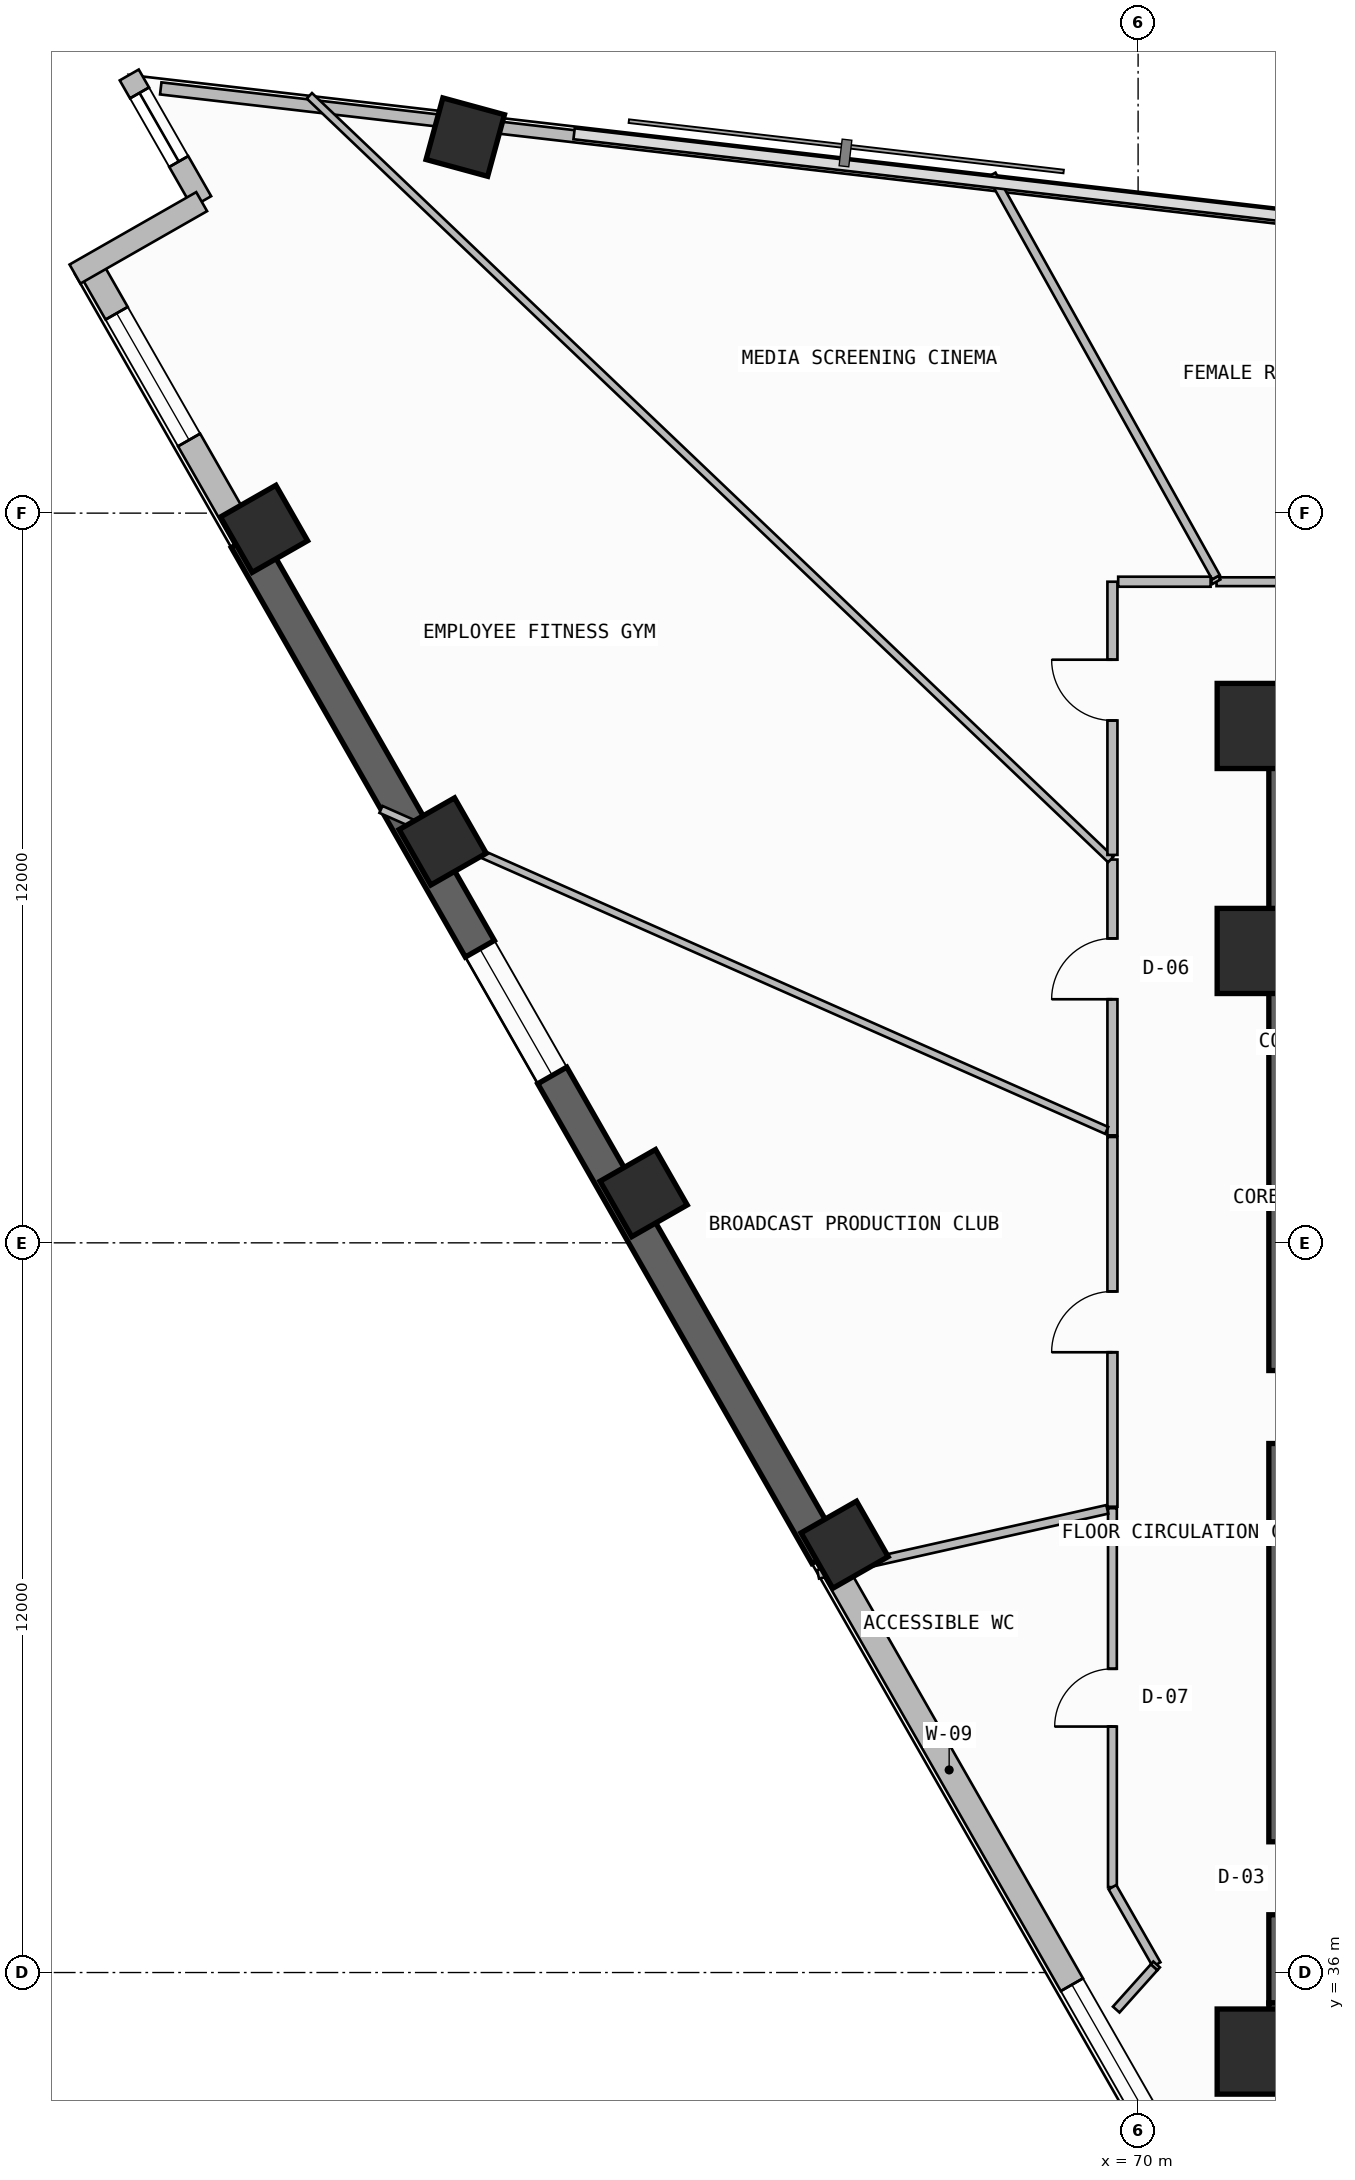
"""IFC4 building model, lengths in metres.
Left out: names, types, materials, properties, quantities, classifications, styles, units other than length and angle.
Written with IfcOpenShell. Run it as: python <this file> out.ifc"""

import sys

from ifc_helpers import new_model, si_unit, direction, frame, frame_2d, origin, origin_2d, place, context, subcontext, project, spatial, rectangle, extrude, element, fill, save


model = new_model("IFC4")
c1 = context("Model", 3, precision=1e-05, world=origin(), true_north=direction((0.0, 1.0)))
c2 = subcontext(c1, "Body", "Model", "MODEL_VIEW")
j1 = project(units=[si_unit("LENGTHUNIT", "METRE"), si_unit("PLANEANGLEUNIT", "RADIAN")], contexts=[c1])
p1 = place(None, origin())
s1 = spatial("IfcSite", under=j1, at=p1, CompositionType="ELEMENT")
p2 = place(p1, origin())
s2 = spatial("IfcBuilding", under=s1, at=p2, CompositionType="ELEMENT")
p3 = place(p2, frame((0.0, 0.0, 218.5)))
s3 = spatial("IfcBuildingStorey", under=s2, at=p3, CompositionType="ELEMENT", Elevation=218.5)
p4 = place(p3, frame((72.525, 35.5, -0.26), z_axis=(0.0, 0.0, 1.0), x_axis=(0.0, 1.0, 0.0)))
e1 = element("IfcWall", 1, at=p4, inside=s3, PredefinedType="SHEAR", context=c2, shape_type="SweptSolid", body=[
    extrude(rectangle(XDim=7.85, YDim=0.75, at=frame_2d((3.925, 0.0))), origin(), (0.0, 0.0, 1.0), 3.52),
])
p5 = place(p4, frame((1.45, 0.0, 0.26)))
e2 = element("IfcOpeningElement", 2, at=p5, cuts=e1, PredefinedType="OPENING", context=c2, shape_type="SweptSolid", body=[
    extrude(rectangle(XDim=1.2, YDim=2.2, at=frame_2d((0.6, 1.1))), frame((0.0, 0.385, 0.0), z_axis=(0.0, -1.0, 0.0), x_axis=(1.0, 0.0, 0.0)), (0.0, 0.0, 1.0), 0.77),
])
p6 = place(p3, frame((72.15, 35.125, -0.26), z_axis=(0.0, 0.0, 1.0), x_axis=(1.0, 0.0, 0.0)))
e3 = element("IfcWall", 3, at=p6, inside=s3, PredefinedType="SHEAR", context=c2, shape_type="SweptSolid", body=[
    extrude(rectangle(XDim=13.6, YDim=0.75, at=frame_2d((6.8, 0.0))), origin(), (0.0, 0.0, 1.0), 3.52),
])
p7 = place(p3, frame((72.525, 43.35, -0.26), z_axis=(0.0, 0.0, 1.0), x_axis=(0.0, 1.0, 0.0)))
e4 = element("IfcWall", 4, at=p7, inside=s3, PredefinedType="SHEAR", context=c2, shape_type="SweptSolid", body=[
    extrude(rectangle(XDim=12.7, YDim=0.75, at=frame_2d((6.35, 0.0))), origin(), (0.0, 0.0, 1.0), 3.52),
])
p8 = place(p7, frame((1.35, 0.0, 0.26)))
e5 = element("IfcOpeningElement", 5, at=p8, cuts=e4, PredefinedType="OPENING", context=c2, shape_type="SweptSolid", body=[
    extrude(rectangle(XDim=1.2, YDim=2.2, at=frame_2d((0.6, 1.1))), frame((0.0, 0.385, 0.0), z_axis=(0.0, -1.0, 0.0), x_axis=(1.0, 0.0, 0.0)), (0.0, 0.0, 1.0), 0.77),
])
p9 = place(p3, frame((72.0, 56.425, -0.26), z_axis=(0.0, 0.0, 1.0), x_axis=(1.0, 0.0, 0.0)))
e6 = element("IfcWall", 6, at=p9, inside=s3, PredefinedType="SHEAR", context=c2, shape_type="SweptSolid", body=[
    extrude(rectangle(XDim=13.75, YDim=0.75, at=frame_2d((6.875, 0.0))), origin(), (0.0, 0.0, 1.0), 3.52),
])
for number, where, z_axis, x_axis in (
    (7, (72.0, 34.7, 0.0), (0.0, 0.0, 1.0), (1.0, 0.0, 0.0)),
    (8, (72.0, 52.8, 0.0), (0.0, 0.0, 1.0), (1.0, 0.0, 0.0)),
    (9, (72.0, 56.5, 0.0), (0.0, 0.0, 1.0), (1.0, 0.0, 0.0)),
):
    element("IfcColumn", number, at=place(p3, frame(where, z_axis=z_axis, x_axis=x_axis)), inside=s3, PredefinedType="COLUMN", context=c2, shape_type="SweptSolid", body=[
        extrude(rectangle(XDim=1.4, YDim=1.4, at=origin_2d()), origin(), (0.0, 0.0, 1.0), 3.52),
    ])
for number, where, z_axis, x_axis in (
    (10, (58.934, 66.184, 0.0), (0.0, 0.0, 1.0), (0.263, 0.965, 0.0)),
    (11, (55.625, 59.742, 0.0), (0.0, 0.0, 1.0), (-0.496, 0.868, 0.0)),
    (12, (58.563, 54.601, 0.0), (0.0, 0.0, 1.0), (-0.496, 0.868, 0.0)),
    (13, (61.868, 48.818, 0.0), (0.0, 0.0, 1.0), (-0.496, 0.868, 0.0)),
    (14, (65.173, 43.035, 0.0), (0.0, 0.0, 1.0), (-0.496, 0.868, 0.0)),
):
    element("IfcColumn", number, at=place(p3, frame(where, z_axis=z_axis, x_axis=x_axis)), inside=s3, PredefinedType="COLUMN", context=c2, shape_type="SweptSolid", body=[
        extrude(rectangle(XDim=1.05, YDim=1.05, at=origin_2d()), origin(), (0.0, 0.0, 1.0), 3.52),
    ])
p10 = place(p3, frame((52.754, 64.068, 0.0), z_axis=(0.0, 0.0, 1.0), x_axis=(0.496209984367, -0.868202540548, 0.0)))
e15 = element("IfcWall", 15, at=p10, inside=s3, PredefinedType="SOLIDWALL", context=c2, shape_type="SweptSolid", body=[
    extrude(rectangle(XDim=5.181, YDim=0.42, at=frame_2d((2.59, 0.0))), origin(), (0.0, 0.0, 1.0), 2.645),
])
p11 = place(p10, frame((0.9, 0.0, 1.1)))
e16 = element("IfcOpeningElement", 16, at=p11, cuts=e15, PredefinedType="OPENING", context=c2, shape_type="SweptSolid", body=[
    extrude(rectangle(XDim=2.4, YDim=1.2, at=frame_2d((1.2, 0.6))), frame((0.0, 0.22, 0.0), z_axis=(0.0, -1.0, 0.0), x_axis=(1.0, 0.0, 0.0)), (0.0, 0.0, 1.0), 0.44),
])
p12 = place(p3, frame((55.325, 59.57, -0.26), z_axis=(0.0, 0.0, 1.0), x_axis=(0.496211351597, -0.868201759124, 0.0)))
e17 = element("IfcWall", 17, at=p12, inside=s3, PredefinedType="SHEAR", context=c2, shape_type="SweptSolid", body=[
    extrude(rectangle(XDim=19.243, YDim=0.55, at=frame_2d((9.622, 0.0))), origin(), (0.0, 0.0, 1.0), 3.52),
])
p13 = place(p12, frame((7.757, 0.0, 1.1)))
e18 = element("IfcOpeningElement", 18, at=p13, cuts=e17, PredefinedType="OPENING", context=c2, shape_type="SweptSolid", body=[
    extrude(rectangle(XDim=2.4, YDim=1.2, at=frame_2d((1.2, 0.6))), frame((0.0, 0.285, 0.0), z_axis=(0.0, -1.0, 0.0), x_axis=(1.0, 0.0, 0.0)), (0.0, 0.0, 1.0), 0.57),
])
p14 = place(p3, frame((64.874, 42.864, 0.0), z_axis=(0.0, 0.0, 1.0), x_axis=(0.49622043329, -0.868196568517, 0.0)))
e19 = element("IfcWall", 19, at=p14, inside=s3, PredefinedType="SOLIDWALL", context=c2, shape_type="SweptSolid", body=[
    extrude(rectangle(XDim=12.582, YDim=0.42, at=frame_2d((6.291, 0.0))), origin(), (0.0, 0.0, 1.0), 2.645),
])
p15 = place(p14, frame((8.136, 0.0, 1.1)))
e20 = element("IfcOpeningElement", 20, at=p15, cuts=e19, PredefinedType="OPENING", context=c2, shape_type="SweptSolid", body=[
    extrude(rectangle(XDim=2.4, YDim=1.2, at=frame_2d((1.2, 0.6))), frame((0.0, 0.22, 0.0), z_axis=(0.0, -1.0, 0.0), x_axis=(1.0, 0.0, 0.0)), (0.0, 0.0, 1.0), 0.44),
])
p16 = place(p3, frame((53.408, 67.206, 0.0), z_axis=(0.0, 0.0, 1.0), x_axis=(0.496292324652, -0.868155474838, 0.0)))
e21 = element("IfcWall", 21, at=p16, inside=s3, PredefinedType="SOLIDWALL", context=c2, shape_type="SweptSolid", body=[
    extrude(rectangle(XDim=2.4, YDim=0.36, at=frame_2d((1.2, 0.0))), origin(), (0.0, 0.0, 1.0), 3.26),
])
p17 = place(p16, frame((0.34, 0.0, 0.45)))
e22 = element("IfcOpeningElement", 22, at=p17, cuts=e21, PredefinedType="OPENING", context=c2, shape_type="SweptSolid", body=[
    extrude(rectangle(XDim=1.3, YDim=2.4, at=frame_2d((0.65, 1.2))), frame((0.0, 0.19, 0.0), z_axis=(0.0, -1.0, 0.0), x_axis=(1.0, 0.0, 0.0)), (0.0, 0.0, 1.0), 0.38),
])
p18 = place(p3, frame((54.599, 65.123, 0.0), z_axis=(0.0, 0.0, 1.0), x_axis=(-0.86818053093, -0.4962484919, 0.0)))
e23 = element("IfcWall", 23, at=p18, inside=s3, PredefinedType="SOLIDWALL", context=c2, shape_type="SweptSolid", body=[
    extrude(rectangle(XDim=2.4, YDim=0.36, at=frame_2d((1.2, 0.0))), origin(), (0.0, 0.0, 1.0), 3.26),
])
p19 = place(p3, frame((85.424, 63.338, 0.0), z_axis=(0.0, 0.0, 1.0), x_axis=(-0.993364714048, 0.115006716693, 0.0)))
e24 = element("IfcWall", 24, at=p19, inside=s3, PredefinedType="PARAPET", context=c2, shape_type="SweptSolid", body=[
    extrude(rectangle(XDim=26.302, YDim=0.2, at=frame_2d((13.151, 0.0))), origin(), (0.0, 0.0, 1.0), 1.15),
])
p20 = place(p3, frame((58.622, 66.441, 0.0), z_axis=(0.0, 0.0, 1.0), x_axis=(-0.993362937665, 0.115022059074, 0.0)))
e25 = element("IfcWall", 25, at=p20, inside=s3, PredefinedType="PARAPET", context=c2, shape_type="SweptSolid", body=[
    extrude(rectangle(XDim=4.727, YDim=0.2, at=frame_2d((2.364, 0.0))), origin(), (0.0, 0.0, 1.0), 1.15),
])
p21 = place(p3, frame((69.578, 43.636, 0.0), z_axis=(0.0, 0.0, 1.0), x_axis=(0.0, -1.0, 0.0)))
e26 = element("IfcWall", 26, at=p21, inside=s3, PredefinedType="PARTITIONING", context=c2, shape_type="SweptSolid", body=[
    extrude(rectangle(XDim=6.232, YDim=0.145, at=frame_2d((3.116, 0.0))), origin(), (0.0, 0.0, 1.0), 3.26),
])
p22 = place(p21, frame((2.641, 0.0, 0.0)))
e27 = element("IfcOpeningElement", 27, at=p22, cuts=e26, PredefinedType="OPENING", context=c2, shape_type="SweptSolid", body=[
    extrude(rectangle(XDim=0.95, YDim=2.15, at=frame_2d((0.475, 1.075))), frame((0.0, 0.083, 0.0), z_axis=(0.0, -1.0, 0.0), x_axis=(1.0, 0.0, 0.0)), (0.0, 0.0, 1.0), 0.165),
])
p23 = place(p3, frame((69.578, 37.404, 0.0), z_axis=(0.0, 0.0, 1.0), x_axis=(0.496138938357, -0.868243142124, 0.0)))
e28 = element("IfcWall", 28, at=p23, inside=s3, PredefinedType="PARTITIONING", context=c2, shape_type="SweptSolid", body=[
    extrude(rectangle(XDim=1.464, YDim=0.145, at=frame_2d((0.732, 0.0))), origin(), (0.0, 0.0, 1.0), 3.26),
])
p24 = place(p3, frame((70.304, 36.133, 0.0), z_axis=(0.0, 0.0, 1.0), x_axis=(-0.667471256218, -0.744635563295, 0.0)))
e29 = element("IfcWall", 29, at=p24, inside=s3, PredefinedType="PARTITIONING", context=c2, shape_type="SweptSolid", body=[
    extrude(rectangle(XDim=0.063, YDim=0.145, at=frame_2d((0.032, 0.0))), origin(), (0.0, 0.0, 1.0), 3.26),
])
p25 = place(p3, frame((64.737, 42.55, 0.0), z_axis=(0.0, 0.0, 1.0), x_axis=(0.975737216423, 0.218944934829, 0.0)))
e30 = element("IfcWall", 30, at=p25, inside=s3, PredefinedType="PARTITIONING", context=c2, shape_type="SweptSolid", body=[
    extrude(rectangle(XDim=4.875, YDim=0.145, at=frame_2d((2.438, 0.0))), origin(), (0.0, 0.0, 1.0), 3.26),
])
p26 = place(p3, frame((77.35, 58.872, 0.0), z_axis=(0.0, 0.0, 1.0), x_axis=(-1.0, 0.0, 0.0)))
e31 = element("IfcWall", 31, at=p26, inside=s3, PredefinedType="PARTITIONING", context=c2, shape_type="SweptSolid", body=[
    extrude(rectangle(XDim=6.061, YDim=0.145, at=frame_2d((3.03, 0.0))), origin(), (0.0, 0.0, 1.0), 3.26),
])
p27 = place(p26, frame((1.866, 0.0, 0.0)))
e32 = element("IfcOpeningElement", 32, at=p27, cuts=e31, PredefinedType="OPENING", context=c2, shape_type="SweptSolid", body=[
    extrude(rectangle(XDim=0.9, YDim=2.1, at=frame_2d((0.45, 1.05))), frame((0.0, 0.083, 0.0), z_axis=(0.0, -1.0, 0.0), x_axis=(1.0, 0.0, 0.0)), (0.0, 0.0, 1.0), 0.165),
])
p28 = place(p3, frame((71.289, 58.872, 0.0), z_axis=(0.0, 0.0, 1.0), x_axis=(-0.493460371412, 0.869768280547, 0.0)))
e33 = element("IfcWall", 33, at=p28, inside=s3, PredefinedType="PARTITIONING", context=c2, shape_type="SweptSolid", body=[
    extrude(rectangle(XDim=0.069, YDim=0.145, at=frame_2d((0.034, 0.0))), origin(), (0.0, 0.0, 1.0), 3.26),
])
p29 = place(p3, frame((71.281, 58.946, 0.0), z_axis=(0.0, 0.0, 1.0), x_axis=(-0.486925562198, 0.873443470912, 0.0)))
e34 = element("IfcWall", 34, at=p29, inside=s3, PredefinedType="PARTITIONING", context=c2, shape_type="SweptSolid", body=[
    extrude(rectangle(XDim=7.576, YDim=0.145, at=frame_2d((3.788, 0.0))), origin(), (0.0, 0.0, 1.0), 3.26),
])
p30 = place(p3, frame((69.578, 54.303, 0.0), z_axis=(0.0, 0.0, 1.0), x_axis=(0.0, -1.0, 0.0)))
e35 = element("IfcWall", 35, at=p30, inside=s3, PredefinedType="PARTITIONING", context=c2, shape_type="SweptSolid", body=[
    extrude(rectangle(XDim=4.536, YDim=0.165, at=frame_2d((2.268, 0.0))), origin(), (0.0, 0.0, 1.0), 2.745),
])
p31 = place(p30, frame((1.298, 0.0, 0.0)))
e36 = element("IfcOpeningElement", 36, at=p31, cuts=e35, PredefinedType="OPENING", context=c2, shape_type="SweptSolid", body=[
    extrude(rectangle(XDim=1.0, YDim=2.2, at=frame_2d((0.5, 1.1))), frame((0.0, 0.093, 0.0), z_axis=(0.0, -1.0, 0.0), x_axis=(1.0, 0.0, 0.0)), (0.0, 0.0, 1.0), 0.185),
])
p32 = place(p3, frame((56.37, 66.863, 0.0), z_axis=(0.0, 0.0, 1.0), x_axis=(0.723906361949, -0.689898238243, 0.0)))
e37 = element("IfcWall", 37, at=p32, inside=s3, PredefinedType="PARTITIONING", context=c2, shape_type="SweptSolid", body=[
    extrude(rectangle(XDim=18.206, YDim=0.125, at=frame_2d((9.103, 0.0))), origin(), (0.0, 0.0, 1.0), 2.645),
])
p33 = place(p3, frame((69.483, 49.849, 0.0), z_axis=(0.0, 0.0, 1.0), x_axis=(-0.914531345425, 0.404515040802, 0.0)))
e38 = element("IfcWall", 38, at=p33, inside=s3, PredefinedType="PARTITIONING", context=c2, shape_type="SweptSolid", body=[
    extrude(rectangle(XDim=13.052, YDim=0.125, at=frame_2d((6.526, 0.0))), origin(), (0.0, 0.0, 1.0), 2.645),
])
p34 = place(p3, frame((69.578, 58.872, 0.0), z_axis=(0.0, 0.0, 1.0), x_axis=(0.0, -1.0, 0.0)))
e39 = element("IfcWall", 39, at=p34, inside=s3, PredefinedType="PARTITIONING", context=c2, shape_type="SweptSolid", body=[
    extrude(rectangle(XDim=4.493, YDim=0.165, at=frame_2d((2.247, 0.0))), origin(), (0.0, 0.0, 1.0), 2.745),
])
p35 = place(p34, frame((1.282, 0.0, 0.0)))
e40 = element("IfcOpeningElement", 40, at=p35, cuts=e39, PredefinedType="OPENING", context=c2, shape_type="SweptSolid", body=[
    extrude(rectangle(XDim=1.0, YDim=2.2, at=frame_2d((0.5, 1.1))), frame((0.0, 0.093, 0.0), z_axis=(0.0, -1.0, 0.0), x_axis=(1.0, 0.0, 0.0)), (0.0, 0.0, 1.0), 0.185),
])
p36 = place(p3, frame((71.192, 58.872, 0.0), z_axis=(0.0, 0.0, 1.0), x_axis=(-1.0, 0.0, 0.0)))
e41 = element("IfcWall", 41, at=p36, inside=s3, PredefinedType="PARTITIONING", context=c2, shape_type="SweptSolid", body=[
    extrude(rectangle(XDim=1.52, YDim=0.165, at=frame_2d((0.76, 0.0))), origin(), (0.0, 0.0, 1.0), 3.26),
])
p37 = place(p3, frame((69.578, 49.741, 0.0), z_axis=(0.0, 0.0, 1.0), x_axis=(0.0, -1.0, 0.0)))
e42 = element("IfcWall", 42, at=p37, inside=s3, PredefinedType="PARTITIONING", context=c2, shape_type="SweptSolid", body=[
    extrude(rectangle(XDim=6.081, YDim=0.165, at=frame_2d((3.041, 0.0))), origin(), (0.0, 0.0, 1.0), 2.745),
])
p38 = place(p37, frame((2.54, 0.0, 0.0)))
e43 = element("IfcOpeningElement", 43, at=p38, cuts=e42, PredefinedType="OPENING", context=c2, shape_type="SweptSolid", body=[
    extrude(rectangle(XDim=1.0, YDim=2.2, at=frame_2d((0.5, 1.1))), frame((0.0, 0.093, 0.0), z_axis=(0.0, -1.0, 0.0), x_axis=(1.0, 0.0, 0.0)), (0.0, 0.0, 1.0), 0.185),
])
p39 = place(p3, frame((70.262, 36.086, 0.0), z_axis=(0.0, 0.0, 1.0), x_axis=(-0.667299757436, -0.744789254572, 0.0)))
e44 = element("IfcWall", 44, at=p39, inside=s3, PredefinedType="PARTITIONING", context=c2, shape_type="SweptSolid", body=[
    extrude(rectangle(XDim=0.933, YDim=0.145, at=frame_2d((0.466, 0.0))), origin(), (0.0, 0.0, 1.0), 3.26),
])
p40 = place(p11, origin())
e45 = element("IfcWindow", 45, at=p40, inside=s3, PartitioningType="SINGLE_PANEL", PredefinedType="WINDOW", context=c2, shape_type="SweptSolid", body=[
    extrude(rectangle(XDim=2.4, YDim=1.2, at=frame_2d((1.2, 0.6))), frame((0.0, 0.03, 0.0), z_axis=(0.0, -1.0, 0.0), x_axis=(1.0, 0.0, 0.0)), (0.0, 0.0, 1.0), 0.06),
])
fill(e16, e45)
p41 = place(p13, origin())
e46 = element("IfcWindow", 46, at=p41, inside=s3, PartitioningType="SINGLE_PANEL", PredefinedType="WINDOW", context=c2, shape_type="SweptSolid", body=[
    extrude(rectangle(XDim=2.4, YDim=1.2, at=frame_2d((1.2, 0.6))), frame((0.0, 0.03, 0.0), z_axis=(0.0, -1.0, 0.0), x_axis=(1.0, 0.0, 0.0)), (0.0, 0.0, 1.0), 0.06),
])
fill(e18, e46)
p42 = place(p15, origin())
e47 = element("IfcWindow", 47, at=p42, inside=s3, PartitioningType="SINGLE_PANEL", PredefinedType="WINDOW", context=c2, shape_type="SweptSolid", body=[
    extrude(rectangle(XDim=2.4, YDim=1.2, at=frame_2d((1.2, 0.6))), frame((0.0, 0.03, 0.0), z_axis=(0.0, -1.0, 0.0), x_axis=(1.0, 0.0, 0.0)), (0.0, 0.0, 1.0), 0.06),
])
fill(e20, e47)
p43 = place(p17, origin())
e48 = element("IfcWindow", 48, at=p43, inside=s3, PartitioningType="SINGLE_PANEL", PredefinedType="WINDOW", context=c2, shape_type="SweptSolid", body=[
    extrude(rectangle(XDim=1.3, YDim=2.4, at=frame_2d((0.65, 1.2))), frame((0.0, 0.03, 0.0), z_axis=(0.0, -1.0, 0.0), x_axis=(1.0, 0.0, 0.0)), (0.0, 0.0, 1.0), 0.06),
])
fill(e22, e48)
p44 = place(p22, frame((0.95, 0.0, 0.0), z_axis=(0.0, 0.0, 1.0), x_axis=(-1.0, 0.0, 0.0)))
e49 = element("IfcDoor", 49, at=p44, inside=s3, OperationType="SINGLE_SWING_LEFT", PredefinedType="DOOR", context=c2, shape_type="SweptSolid", body=[
    extrude(rectangle(XDim=0.95, YDim=2.15, at=frame_2d((0.475, 1.075))), frame((0.0, 0.025, 0.0), z_axis=(0.0, -1.0, 0.0), x_axis=(1.0, 0.0, 0.0)), (0.0, 0.0, 1.0), 0.05),
])
fill(e27, e49)
p45 = place(p31, frame((1.0, 0.0, 0.0), z_axis=(0.0, 0.0, 1.0), x_axis=(-1.0, 0.0, 0.0)))
e50 = element("IfcDoor", 50, at=p45, inside=s3, OperationType="SINGLE_SWING_LEFT", PredefinedType="DOOR", context=c2, shape_type="SweptSolid", body=[
    extrude(rectangle(XDim=1.0, YDim=2.2, at=frame_2d((0.5, 1.1))), frame((0.0, 0.025, 0.0), z_axis=(0.0, -1.0, 0.0), x_axis=(1.0, 0.0, 0.0)), (0.0, 0.0, 1.0), 0.05),
])
fill(e36, e50)
p46 = place(p35, frame((1.0, 0.0, 0.0), z_axis=(0.0, 0.0, 1.0), x_axis=(-1.0, 0.0, 0.0)))
e51 = element("IfcDoor", 51, at=p46, inside=s3, OperationType="SINGLE_SWING_RIGHT", PredefinedType="DOOR", context=c2, shape_type="SweptSolid", body=[
    extrude(rectangle(XDim=1.0, YDim=2.2, at=frame_2d((0.5, 1.1))), frame((0.0, 0.025, 0.0), z_axis=(0.0, -1.0, 0.0), x_axis=(1.0, 0.0, 0.0)), (0.0, 0.0, 1.0), 0.05),
])
fill(e40, e51)
p47 = place(p38, frame((1.0, 0.0, 0.0), z_axis=(0.0, 0.0, 1.0), x_axis=(-1.0, 0.0, 0.0)))
e52 = element("IfcDoor", 52, at=p47, inside=s3, OperationType="SINGLE_SWING_LEFT", PredefinedType="DOOR", context=c2, shape_type="SweptSolid", body=[
    extrude(rectangle(XDim=1.0, YDim=2.2, at=frame_2d((0.5, 1.1))), frame((0.0, 0.025, 0.0), z_axis=(0.0, -1.0, 0.0), x_axis=(1.0, 0.0, 0.0)), (0.0, 0.0, 1.0), 0.05),
])
fill(e43, e52)
save(model, sys.argv[1])
